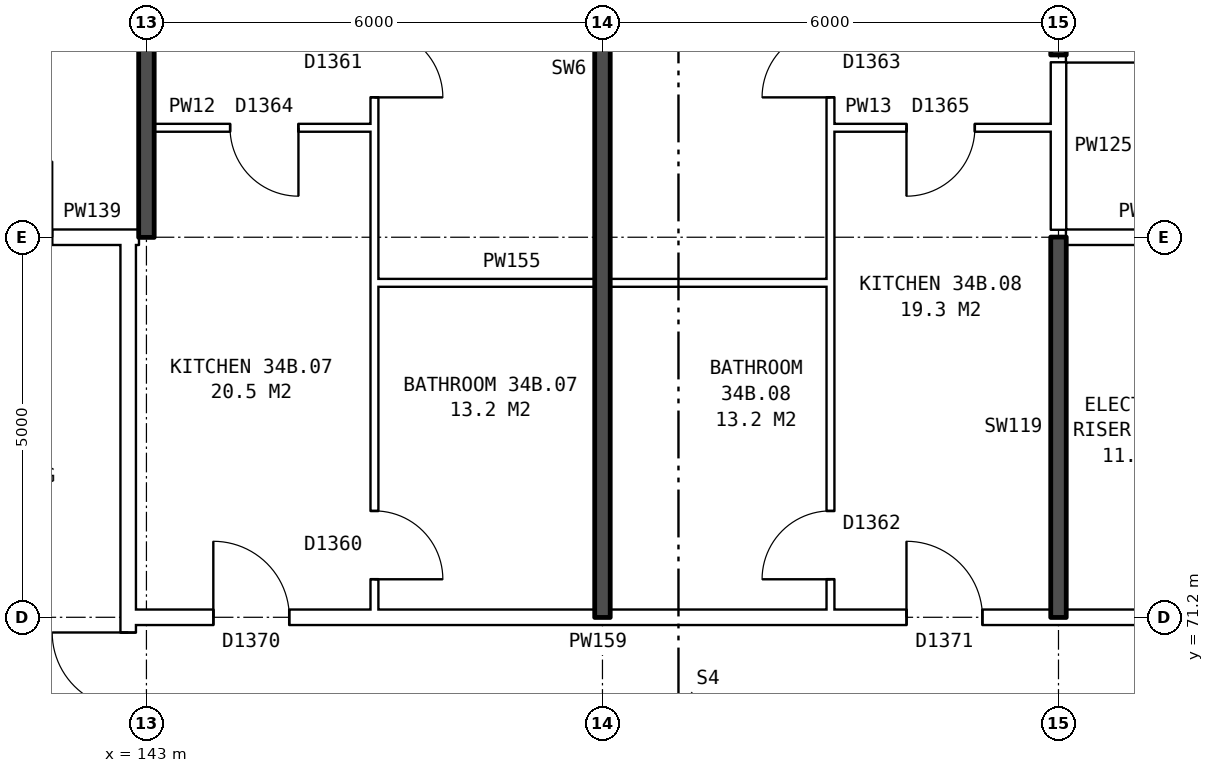
"""IFC4 building model, lengths in metres.
Left out: names, types, materials, properties, quantities, classifications, styles, units other than length and angle.
Written with IfcOpenShell. Run it as: python <this file> out.ifc"""

import sys

from ifc_helpers import new_model, si_unit, direction, frame, frame_2d, origin, place, context, subcontext, project, spatial, rectangle, extrude, element, fill, save


model = new_model("IFC4")
c1 = context("Model", 3, precision=1e-05, world=origin(), true_north=direction((0.0, 1.0)))
c2 = subcontext(c1, "Body", "Model", "MODEL_VIEW")
j1 = project(units=[si_unit("LENGTHUNIT", "METRE"), si_unit("PLANEANGLEUNIT", "RADIAN")], contexts=[c1])
p1 = place(None, origin())
s1 = spatial("IfcSite", under=j1, at=p1, CompositionType="ELEMENT")
p2 = place(p1, origin())
s2 = spatial("IfcBuilding", under=s1, at=p2, CompositionType="ELEMENT")
p3 = place(p2, frame((0.0, 0.0, 123.7)))
s3 = spatial("IfcBuildingStorey", under=s2, at=p3, CompositionType="ELEMENT", Elevation=123.7)
p4 = place(p3, frame((142.76, 63.9, 0.0), z_axis=(0.0, 0.0, 1.0), x_axis=(0.0, 1.0, 0.0)))
e1 = element("IfcWall", 1, at=p4, inside=s3, PredefinedType="PARTITIONING", context=c2, shape_type="SweptSolid", body=[
    extrude(rectangle(XDim=12.2, YDim=0.2, at=frame_2d((6.1, 0.0))), origin(), (0.0, 0.0, 1.0), 2.85),
])
p5 = place(p4, frame((5.1, 0.0, 0.0)))
e2 = element("IfcOpeningElement", 2, at=p5, cuts=e1, PredefinedType="OPENING", context=c2, shape_type="SweptSolid", body=[
    extrude(rectangle(XDim=2.0, YDim=2.1, at=frame_2d((1.0, 1.05))), frame((0.0, 0.11, 0.0), z_axis=(0.0, -1.0, 0.0), x_axis=(1.0, 0.0, 0.0)), (0.0, 0.0, 1.0), 0.22),
])
p6 = place(p3, frame((142.76, 71.2, 0.0), z_axis=(0.0, 0.0, 1.0), x_axis=(1.0, 0.0, 0.0)))
e3 = element("IfcWall", 3, at=p6, inside=s3, PredefinedType="PARTITIONING", context=c2, shape_type="SweptSolid", body=[
    extrude(rectangle(XDim=14.48, YDim=0.2, at=frame_2d((7.24, 0.0))), origin(), (0.0, 0.0, 1.0), 2.85),
])
p7 = place(p6, frame((1.12, 0.0, 0.0)))
e4 = element("IfcOpeningElement", 4, at=p7, cuts=e3, PredefinedType="OPENING", context=c2, shape_type="SweptSolid", body=[
    extrude(rectangle(XDim=1.0, YDim=2.1, at=frame_2d((0.5, 1.05))), frame((0.0, 0.11, 0.0), z_axis=(0.0, -1.0, 0.0), x_axis=(1.0, 0.0, 0.0)), (0.0, 0.0, 1.0), 0.22),
])
p8 = place(p6, frame((10.24, 0.0, 0.0)))
e5 = element("IfcOpeningElement", 5, at=p8, cuts=e3, PredefinedType="OPENING", context=c2, shape_type="SweptSolid", body=[
    extrude(rectangle(XDim=1.0, YDim=2.1, at=frame_2d((0.5, 1.05))), frame((0.0, 0.11, 0.0), z_axis=(0.0, -1.0, 0.0), x_axis=(1.0, 0.0, 0.0)), (0.0, 0.0, 1.0), 0.22),
])
p9 = place(p3, frame((146.0, 75.6, 0.0), z_axis=(0.0, 0.0, 1.0), x_axis=(1.0, 0.0, 0.0)))
e6 = element("IfcWall", 6, at=p9, inside=s3, PredefinedType="PARTITIONING", context=c2, shape_type="SweptSolid", body=[
    extrude(rectangle(XDim=6.0, YDim=0.1, at=frame_2d((3.0, 0.0))), origin(), (0.0, 0.0, 1.0), 2.85),
])
p10 = place(p3, frame((139.76, 76.2, 0.0), z_axis=(0.0, 0.0, 1.0), x_axis=(1.0, 0.0, 0.0)))
e7 = element("IfcWall", 7, at=p10, inside=s3, PredefinedType="PARTITIONING", context=c2, shape_type="SweptSolid", body=[
    extrude(rectangle(XDim=3.0, YDim=0.2, at=frame_2d((1.5, 0.0))), origin(), (0.0, 0.0, 1.0), 2.85),
])
p11 = place(p10, frame((1.0, 0.0, 0.0)))
e8 = element("IfcOpeningElement", 8, at=p11, cuts=e7, PredefinedType="OPENING", context=c2, shape_type="SweptSolid", body=[
    extrude(rectangle(XDim=1.0, YDim=2.1, at=frame_2d((0.5, 1.05))), frame((0.0, 0.11, 0.0), z_axis=(0.0, -1.0, 0.0), x_axis=(1.0, 0.0, 0.0)), (0.0, 0.0, 1.0), 0.22),
])
p12 = place(p3, frame((142.76, 76.2, 0.0), z_axis=(0.0, 0.0, 1.0), x_axis=(1.0, 0.0, 0.0)))
e9 = element("IfcWall", 9, at=p12, inside=s3, PredefinedType="PARTITIONING", context=c2, shape_type="SweptSolid", body=[
    extrude(rectangle(XDim=0.14, YDim=0.2, at=frame_2d((0.07, 0.0))), origin(), (0.0, 0.0, 1.0), 2.85),
])
p13 = place(p3, frame((155.1, 76.2, 0.0), z_axis=(0.0, 0.0, 1.0), x_axis=(1.0, 0.0, 0.0)))
e10 = element("IfcWall", 10, at=p13, inside=s3, PredefinedType="PARTITIONING", context=c2, shape_type="SweptSolid", body=[
    extrude(rectangle(XDim=2.14, YDim=0.2, at=frame_2d((1.07, 0.0))), origin(), (0.0, 0.0, 1.0), 2.85),
])
p14 = place(p3, frame((143.1, 77.64, 0.0), z_axis=(0.0, 0.0, 1.0), x_axis=(1.0, 0.0, 0.0)))
e11 = element("IfcWall", 11, at=p14, inside=s3, PredefinedType="PARTITIONING", context=c2, shape_type="SweptSolid", body=[
    extrude(rectangle(XDim=2.9, YDim=0.1, at=frame_2d((1.45, 0.0))), origin(), (0.0, 0.0, 1.0), 2.85),
])
p15 = place(p14, frame((1.0, 0.0, 0.0)))
e12 = element("IfcOpeningElement", 12, at=p15, cuts=e11, PredefinedType="OPENING", context=c2, shape_type="SweptSolid", body=[
    extrude(rectangle(XDim=0.9, YDim=2.1, at=frame_2d((0.45, 1.05))), frame((0.0, 0.06, 0.0), z_axis=(0.0, -1.0, 0.0), x_axis=(1.0, 0.0, 0.0)), (0.0, 0.0, 1.0), 0.12),
])
p16 = place(p3, frame((152.0, 77.64, 0.0), z_axis=(0.0, 0.0, 1.0), x_axis=(1.0, 0.0, 0.0)))
e13 = element("IfcWall", 13, at=p16, inside=s3, PredefinedType="PARTITIONING", context=c2, shape_type="SweptSolid", body=[
    extrude(rectangle(XDim=2.9, YDim=0.1, at=frame_2d((1.45, 0.0))), origin(), (0.0, 0.0, 1.0), 2.85),
])
p17 = place(p16, frame((1.0, 0.0, 0.0)))
e14 = element("IfcOpeningElement", 14, at=p17, cuts=e13, PredefinedType="OPENING", context=c2, shape_type="SweptSolid", body=[
    extrude(rectangle(XDim=0.9, YDim=2.1, at=frame_2d((0.45, 1.05))), frame((0.0, 0.06, 0.0), z_axis=(0.0, -1.0, 0.0), x_axis=(1.0, 0.0, 0.0)), (0.0, 0.0, 1.0), 0.12),
])
p18 = place(p3, frame((155.1, 78.6, 0.0), z_axis=(0.0, 0.0, 1.0), x_axis=(1.0, 0.0, 0.0)))
e15 = element("IfcWall", 15, at=p18, inside=s3, PredefinedType="PARTITIONING", context=c2, shape_type="SweptSolid", body=[
    extrude(rectangle(XDim=17.29, YDim=0.2, at=frame_2d((8.645, 0.0))), origin(), (0.0, 0.0, 1.0), 2.85),
])
p19 = place(p18, frame((3.6, 0.0, 0.0)))
e16 = element("IfcOpeningElement", 16, at=p19, cuts=e15, PredefinedType="OPENING", context=c2, shape_type="SweptSolid", body=[
    extrude(rectangle(XDim=1.0, YDim=2.1, at=frame_2d((0.5, 1.05))), frame((0.0, 0.11, 0.0), z_axis=(0.0, -1.0, 0.0), x_axis=(1.0, 0.0, 0.0)), (0.0, 0.0, 1.0), 0.22),
])
p20 = place(p18, frame((8.4, 0.0, 0.0)))
e17 = element("IfcOpeningElement", 17, at=p20, cuts=e15, PredefinedType="OPENING", context=c2, shape_type="SweptSolid", body=[
    extrude(rectangle(XDim=1.0, YDim=2.1, at=frame_2d((0.5, 1.05))), frame((0.0, 0.11, 0.0), z_axis=(0.0, -1.0, 0.0), x_axis=(1.0, 0.0, 0.0)), (0.0, 0.0, 1.0), 0.22),
])
p21 = place(p3, frame((143.0, 76.2, 0.0), z_axis=(0.0, 0.0, 1.0), x_axis=(0.0, 1.0, 0.0)))
e18 = element("IfcWall", 18, at=p21, inside=s3, PredefinedType="SOLIDWALL", context=c2, shape_type="SweptSolid", body=[
    extrude(rectangle(XDim=9.44, YDim=0.2, at=frame_2d((4.72, 0.0))), origin(), (0.0, 0.0, 1.0), 2.85),
])
p22 = place(p3, frame((146.0, 71.3, 0.0), z_axis=(0.0, 0.0, 1.0), x_axis=(0.0, 1.0, 0.0)))
e19 = element("IfcWall", 19, at=p22, inside=s3, PredefinedType="PARTITIONING", context=c2, shape_type="SweptSolid", body=[
    extrude(rectangle(XDim=14.34, YDim=0.1, at=frame_2d((7.17, 0.0))), origin(), (0.0, 0.0, 1.0), 2.85),
])
p23 = place(p22, frame((6.74, 0.0, 0.0)))
e20 = element("IfcOpeningElement", 20, at=p23, cuts=e19, PredefinedType="OPENING", context=c2, shape_type="SweptSolid", body=[
    extrude(rectangle(XDim=0.9, YDim=2.1, at=frame_2d((0.45, 1.05))), frame((0.0, 0.06, 0.0), z_axis=(0.0, -1.0, 0.0), x_axis=(1.0, 0.0, 0.0)), (0.0, 0.0, 1.0), 0.12),
])
p24 = place(p22, frame((0.4, 0.0, 0.0)))
e21 = element("IfcOpeningElement", 21, at=p24, cuts=e19, PredefinedType="OPENING", context=c2, shape_type="SweptSolid", body=[
    extrude(rectangle(XDim=0.9, YDim=2.1, at=frame_2d((0.45, 1.05))), frame((0.0, 0.06, 0.0), z_axis=(0.0, -1.0, 0.0), x_axis=(1.0, 0.0, 0.0)), (0.0, 0.0, 1.0), 0.12),
])
p25 = place(p3, frame((149.0, 71.2, 0.0), z_axis=(0.0, 0.0, 1.0), x_axis=(0.0, 1.0, 0.0)))
e22 = element("IfcWall", 22, at=p25, inside=s3, PredefinedType="SOLIDWALL", context=c2, shape_type="SweptSolid", body=[
    extrude(rectangle(XDim=14.44, YDim=0.2, at=frame_2d((7.22, 0.0))), origin(), (0.0, 0.0, 1.0), 2.85),
])
p26 = place(p3, frame((152.0, 71.3, 0.0), z_axis=(0.0, 0.0, 1.0), x_axis=(0.0, 1.0, 0.0)))
e23 = element("IfcWall", 23, at=p26, inside=s3, PredefinedType="PARTITIONING", context=c2, shape_type="SweptSolid", body=[
    extrude(rectangle(XDim=14.34, YDim=0.1, at=frame_2d((7.17, 0.0))), origin(), (0.0, 0.0, 1.0), 2.85),
])
p27 = place(p26, frame((6.74, 0.0, 0.0)))
e24 = element("IfcOpeningElement", 24, at=p27, cuts=e23, PredefinedType="OPENING", context=c2, shape_type="SweptSolid", body=[
    extrude(rectangle(XDim=0.9, YDim=2.1, at=frame_2d((0.45, 1.05))), frame((0.0, 0.06, 0.0), z_axis=(0.0, -1.0, 0.0), x_axis=(1.0, 0.0, 0.0)), (0.0, 0.0, 1.0), 0.12),
])
p28 = place(p26, frame((0.4, 0.0, 0.0)))
e25 = element("IfcOpeningElement", 25, at=p28, cuts=e23, PredefinedType="OPENING", context=c2, shape_type="SweptSolid", body=[
    extrude(rectangle(XDim=0.9, YDim=2.1, at=frame_2d((0.45, 1.05))), frame((0.0, 0.06, 0.0), z_axis=(0.0, -1.0, 0.0), x_axis=(1.0, 0.0, 0.0)), (0.0, 0.0, 1.0), 0.12),
])
p29 = place(p3, frame((155.0, 71.2, 0.0), z_axis=(0.0, 0.0, 1.0), x_axis=(0.0, 1.0, 0.0)))
e26 = element("IfcWall", 26, at=p29, inside=s3, PredefinedType="SOLIDWALL", context=c2, shape_type="SweptSolid", body=[
    extrude(rectangle(XDim=5.0, YDim=0.2, at=frame_2d((2.5, 0.0))), origin(), (0.0, 0.0, 1.0), 2.85),
])
p30 = place(p3, frame((155.0, 76.3, 0.0), z_axis=(0.0, 0.0, 1.0), x_axis=(0.0, 1.0, 0.0)))
e27 = element("IfcWall", 27, at=p30, inside=s3, PredefinedType="PARTITIONING", context=c2, shape_type="SweptSolid", body=[
    extrude(rectangle(XDim=2.2, YDim=0.2, at=frame_2d((1.1, 0.0))), origin(), (0.0, 0.0, 1.0), 2.85),
])
p31 = place(p3, frame((155.0, 78.6, 0.0), z_axis=(0.0, 0.0, 1.0), x_axis=(0.0, 1.0, 0.0)))
e28 = element("IfcWall", 28, at=p31, inside=s3, PredefinedType="SOLIDWALL", context=c2, shape_type="SweptSolid", body=[
    extrude(rectangle(XDim=7.04, YDim=0.2, at=frame_2d((3.52, 0.0))), origin(), (0.0, 0.0, 1.0), 2.85),
])
p32 = place(p5, origin())
e29 = element("IfcDoor", 29, at=p32, inside=s3, OperationType="DOUBLE_DOOR_SINGLE_SWING", PredefinedType="DOOR", context=c2, shape_type="SweptSolid", body=[
    extrude(rectangle(XDim=2.0, YDim=2.1, at=frame_2d((1.0, 1.05))), frame((0.0, 0.025, 0.0), z_axis=(0.0, -1.0, 0.0), x_axis=(1.0, 0.0, 0.0)), (0.0, 0.0, 1.0), 0.05),
])
fill(e2, e29)
p33 = place(p23, frame((0.9, 0.0, 0.0), z_axis=(0.0, 0.0, 1.0), x_axis=(-1.0, 0.0, 0.0)))
e30 = element("IfcDoor", 30, at=p33, inside=s3, OperationType="SINGLE_SWING_RIGHT", PredefinedType="DOOR", context=c2, shape_type="SweptSolid", body=[
    extrude(rectangle(XDim=0.9, YDim=2.1, at=frame_2d((0.45, 1.05))), frame((0.0, 0.025, 0.0), z_axis=(0.0, -1.0, 0.0), x_axis=(1.0, 0.0, 0.0)), (0.0, 0.0, 1.0), 0.05),
])
fill(e20, e30)
p34 = place(p7, origin())
e31 = element("IfcDoor", 31, at=p34, inside=s3, OperationType="SINGLE_SWING_LEFT", PredefinedType="DOOR", context=c2, shape_type="SweptSolid", body=[
    extrude(rectangle(XDim=1.0, YDim=2.1, at=frame_2d((0.5, 1.05))), frame((0.0, 0.025, 0.0), z_axis=(0.0, -1.0, 0.0), x_axis=(1.0, 0.0, 0.0)), (0.0, 0.0, 1.0), 0.05),
])
fill(e4, e31)
p35 = place(p15, frame((0.9, 0.0, 0.0), z_axis=(0.0, 0.0, 1.0), x_axis=(-1.0, 0.0, 0.0)))
e32 = element("IfcDoor", 32, at=p35, inside=s3, OperationType="SINGLE_SWING_LEFT", PredefinedType="DOOR", context=c2, shape_type="SweptSolid", body=[
    extrude(rectangle(XDim=0.9, YDim=2.1, at=frame_2d((0.45, 1.05))), frame((0.0, 0.025, 0.0), z_axis=(0.0, -1.0, 0.0), x_axis=(1.0, 0.0, 0.0)), (0.0, 0.0, 1.0), 0.05),
])
fill(e12, e32)
p36 = place(p24, frame((0.9, 0.0, 0.0), z_axis=(0.0, 0.0, 1.0), x_axis=(-1.0, 0.0, 0.0)))
e33 = element("IfcDoor", 33, at=p36, inside=s3, OperationType="SINGLE_SWING_RIGHT", PredefinedType="DOOR", context=c2, shape_type="SweptSolid", body=[
    extrude(rectangle(XDim=0.9, YDim=2.1, at=frame_2d((0.45, 1.05))), frame((0.0, 0.025, 0.0), z_axis=(0.0, -1.0, 0.0), x_axis=(1.0, 0.0, 0.0)), (0.0, 0.0, 1.0), 0.05),
])
fill(e21, e33)
p37 = place(p27, origin())
e34 = element("IfcDoor", 34, at=p37, inside=s3, OperationType="SINGLE_SWING_LEFT", PredefinedType="DOOR", context=c2, shape_type="SweptSolid", body=[
    extrude(rectangle(XDim=0.9, YDim=2.1, at=frame_2d((0.45, 1.05))), frame((0.0, 0.025, 0.0), z_axis=(0.0, -1.0, 0.0), x_axis=(1.0, 0.0, 0.0)), (0.0, 0.0, 1.0), 0.05),
])
fill(e24, e34)
p38 = place(p8, origin())
e35 = element("IfcDoor", 35, at=p38, inside=s3, OperationType="SINGLE_SWING_LEFT", PredefinedType="DOOR", context=c2, shape_type="SweptSolid", body=[
    extrude(rectangle(XDim=1.0, YDim=2.1, at=frame_2d((0.5, 1.05))), frame((0.0, 0.025, 0.0), z_axis=(0.0, -1.0, 0.0), x_axis=(1.0, 0.0, 0.0)), (0.0, 0.0, 1.0), 0.05),
])
fill(e5, e35)
p39 = place(p17, frame((0.9, 0.0, 0.0), z_axis=(0.0, 0.0, 1.0), x_axis=(-1.0, 0.0, 0.0)))
e36 = element("IfcDoor", 36, at=p39, inside=s3, OperationType="SINGLE_SWING_RIGHT", PredefinedType="DOOR", context=c2, shape_type="SweptSolid", body=[
    extrude(rectangle(XDim=0.9, YDim=2.1, at=frame_2d((0.45, 1.05))), frame((0.0, 0.025, 0.0), z_axis=(0.0, -1.0, 0.0), x_axis=(1.0, 0.0, 0.0)), (0.0, 0.0, 1.0), 0.05),
])
fill(e14, e36)
p40 = place(p28, origin())
e37 = element("IfcDoor", 37, at=p40, inside=s3, OperationType="SINGLE_SWING_LEFT", PredefinedType="DOOR", context=c2, shape_type="SweptSolid", body=[
    extrude(rectangle(XDim=0.9, YDim=2.1, at=frame_2d((0.45, 1.05))), frame((0.0, 0.025, 0.0), z_axis=(0.0, -1.0, 0.0), x_axis=(1.0, 0.0, 0.0)), (0.0, 0.0, 1.0), 0.05),
])
fill(e25, e37)
save(model, sys.argv[1])
